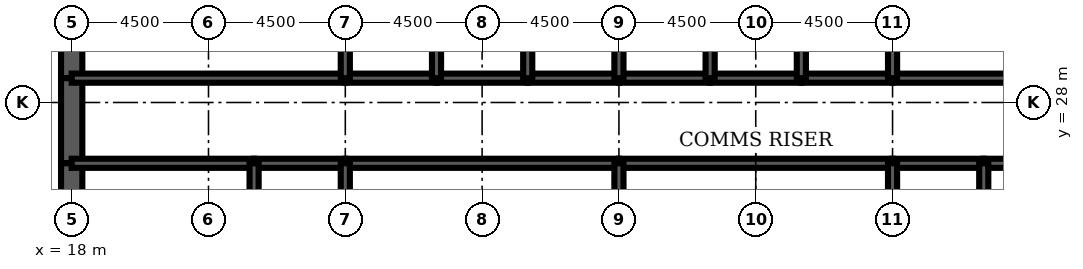
"""IFC4 building model, lengths in metres.
Left out: names, types, materials, properties, quantities, classifications, styles, units other than length and angle.
Written with IfcOpenShell. Run it as: python <this file> out.ifc"""

import sys

from ifc_helpers import new_model, si_unit, direction, frame, frame_2d, origin, place, context, subcontext, project, spatial, rectangle, extrude, element, fill, save


model = new_model("IFC4")
c1 = context("Model", 3, precision=1e-05, world=origin(), true_north=direction((0.0, 1.0)))
c2 = subcontext(c1, "Body", "Model", "MODEL_VIEW")
j1 = project(units=[si_unit("LENGTHUNIT", "METRE"), si_unit("PLANEANGLEUNIT", "RADIAN")], contexts=[c1])
p1 = place(None, origin())
s1 = spatial("IfcSite", under=j1, at=p1, CompositionType="ELEMENT")
p2 = place(p1, origin())
s2 = spatial("IfcBuilding", under=s1, at=p2, CompositionType="ELEMENT")
p3 = place(p2, frame((0.0, 0.0, 304.7)))
s3 = spatial("IfcBuildingStorey", under=s2, at=p3, CompositionType="ELEMENT", Elevation=304.7)
p4 = place(p3, frame((18.0, 32.0, 0.0), z_axis=(0.0, 0.0, 1.0), x_axis=(0.0, -1.0, 0.0)))
e1 = element("IfcWall", 1, at=p4, inside=s3, PredefinedType="SHEAR", context=c2, shape_type="SweptSolid", body=[
    extrude(rectangle(XDim=3.2, YDim=0.7, at=frame_2d((1.6, 0.0))), origin(), (0.0, 0.0, 1.0), 4.2),
])
p5 = place(p3, frame((18.0, 28.8, 0.0), z_axis=(0.0, 0.0, 1.0), x_axis=(0.0, -1.0, 0.0)))
e2 = element("IfcWall", 2, at=p5, inside=s3, PredefinedType="SHEAR", context=c2, shape_type="SweptSolid", body=[
    extrude(rectangle(XDim=2.8, YDim=0.7, at=frame_2d((1.4, 0.0))), origin(), (0.0, 0.0, 1.0), 4.2),
])
p6 = place(p5, frame((0.4, 0.0, 0.0)))
e3 = element("IfcOpeningElement", 3, at=p6, cuts=e2, PredefinedType="OPENING", context=c2, shape_type="SweptSolid", body=[
    extrude(rectangle(XDim=1.8, YDim=2.1, at=frame_2d((0.9, 1.05))), frame((0.0, 0.36, 0.0), z_axis=(0.0, -1.0, 0.0), x_axis=(1.0, 0.0, 0.0)), (0.0, 0.0, 1.0), 0.72),
])
p7 = place(p3, frame((18.0, 26.0, 0.0), z_axis=(0.0, 0.0, 1.0), x_axis=(0.0, -1.0, 0.0)))
e4 = element("IfcWall", 4, at=p7, inside=s3, PredefinedType="SHEAR", context=c2, shape_type="SweptSolid", body=[
    extrude(rectangle(XDim=4.0, YDim=0.7, at=frame_2d((2.0, 0.0))), origin(), (0.0, 0.0, 1.0), 4.2),
])
p8 = place(p3, frame((18.0, 28.8, 0.0), z_axis=(0.0, 0.0, 1.0), x_axis=(1.0, 0.0, 0.0)))
e5 = element("IfcWall", 5, at=p8, inside=s3, PredefinedType="SOLIDWALL", context=c2, shape_type="SweptSolid", body=[
    extrude(rectangle(XDim=9.0, YDim=0.3, at=frame_2d((4.5, 0.0))), origin(), (0.0, 0.0, 1.0), 4.2),
])
p9 = place(p8, frame((0.65, 0.0, 0.0)))
e6 = element("IfcOpeningElement", 6, at=p9, cuts=e5, PredefinedType="OPENING", context=c2, shape_type="SweptSolid", body=[
    extrude(rectangle(XDim=1.0, YDim=2.1, at=frame_2d((0.5, 1.05))), frame((0.0, 0.16, 0.0), z_axis=(0.0, -1.0, 0.0), x_axis=(1.0, 0.0, 0.0)), (0.0, 0.0, 1.0), 0.32),
])
p10 = place(p3, frame((27.0, 28.8, 0.0), z_axis=(0.0, 0.0, 1.0), x_axis=(1.0, 0.0, 0.0)))
e7 = element("IfcWall", 7, at=p10, inside=s3, PredefinedType="SOLIDWALL", context=c2, shape_type="SweptSolid", body=[
    extrude(rectangle(XDim=3.0, YDim=0.3, at=frame_2d((1.5, 0.0))), origin(), (0.0, 0.0, 1.0), 4.2),
])
p11 = place(p10, frame((0.95, 0.0, 0.0)))
e8 = element("IfcOpeningElement", 8, at=p11, cuts=e7, PredefinedType="OPENING", context=c2, shape_type="SweptSolid", body=[
    extrude(rectangle(XDim=1.1, YDim=2.2, at=frame_2d((0.55, 1.1))), frame((0.0, 0.16, 0.0), z_axis=(0.0, -1.0, 0.0), x_axis=(1.0, 0.0, 0.0)), (0.0, 0.0, 1.0), 0.32),
])
p12 = place(p3, frame((30.0, 28.8, 0.0), z_axis=(0.0, 0.0, 1.0), x_axis=(1.0, 0.0, 0.0)))
e9 = element("IfcWall", 9, at=p12, inside=s3, PredefinedType="SOLIDWALL", context=c2, shape_type="SweptSolid", body=[
    extrude(rectangle(XDim=3.0, YDim=0.3, at=frame_2d((1.5, 0.0))), origin(), (0.0, 0.0, 1.0), 4.2),
])
p13 = place(p12, frame((0.95, 0.0, 0.0)))
e10 = element("IfcOpeningElement", 10, at=p13, cuts=e9, PredefinedType="OPENING", context=c2, shape_type="SweptSolid", body=[
    extrude(rectangle(XDim=1.1, YDim=2.2, at=frame_2d((0.55, 1.1))), frame((0.0, 0.16, 0.0), z_axis=(0.0, -1.0, 0.0), x_axis=(1.0, 0.0, 0.0)), (0.0, 0.0, 1.0), 0.32),
])
p14 = place(p3, frame((33.0, 28.8, 0.0), z_axis=(0.0, 0.0, 1.0), x_axis=(1.0, 0.0, 0.0)))
e11 = element("IfcWall", 11, at=p14, inside=s3, PredefinedType="SOLIDWALL", context=c2, shape_type="SweptSolid", body=[
    extrude(rectangle(XDim=3.0, YDim=0.3, at=frame_2d((1.5, 0.0))), origin(), (0.0, 0.0, 1.0), 4.2),
])
p15 = place(p14, frame((0.95, 0.0, 0.0)))
e12 = element("IfcOpeningElement", 12, at=p15, cuts=e11, PredefinedType="OPENING", context=c2, shape_type="SweptSolid", body=[
    extrude(rectangle(XDim=1.1, YDim=2.2, at=frame_2d((0.55, 1.1))), frame((0.0, 0.16, 0.0), z_axis=(0.0, -1.0, 0.0), x_axis=(1.0, 0.0, 0.0)), (0.0, 0.0, 1.0), 0.32),
])
p16 = place(p3, frame((36.0, 28.8, 0.0), z_axis=(0.0, 0.0, 1.0), x_axis=(1.0, 0.0, 0.0)))
e13 = element("IfcWall", 13, at=p16, inside=s3, PredefinedType="SOLIDWALL", context=c2, shape_type="SweptSolid", body=[
    extrude(rectangle(XDim=3.0, YDim=0.3, at=frame_2d((1.5, 0.0))), origin(), (0.0, 0.0, 1.0), 4.2),
])
p17 = place(p16, frame((1.0, 0.0, 0.0)))
e14 = element("IfcOpeningElement", 14, at=p17, cuts=e13, PredefinedType="OPENING", context=c2, shape_type="SweptSolid", body=[
    extrude(rectangle(XDim=1.0, YDim=2.1, at=frame_2d((0.5, 1.05))), frame((0.0, 0.16, 0.0), z_axis=(0.0, -1.0, 0.0), x_axis=(1.0, 0.0, 0.0)), (0.0, 0.0, 1.0), 0.32),
])
p18 = place(p3, frame((39.0, 28.8, 0.0), z_axis=(0.0, 0.0, 1.0), x_axis=(1.0, 0.0, 0.0)))
e15 = element("IfcWall", 15, at=p18, inside=s3, PredefinedType="SOLIDWALL", context=c2, shape_type="SweptSolid", body=[
    extrude(rectangle(XDim=3.0, YDim=0.3, at=frame_2d((1.5, 0.0))), origin(), (0.0, 0.0, 1.0), 4.2),
])
p19 = place(p18, frame((1.0, 0.0, 0.0)))
e16 = element("IfcOpeningElement", 16, at=p19, cuts=e15, PredefinedType="OPENING", context=c2, shape_type="SweptSolid", body=[
    extrude(rectangle(XDim=1.0, YDim=2.1, at=frame_2d((0.5, 1.05))), frame((0.0, 0.16, 0.0), z_axis=(0.0, -1.0, 0.0), x_axis=(1.0, 0.0, 0.0)), (0.0, 0.0, 1.0), 0.32),
])
p20 = place(p3, frame((42.0, 28.8, 0.0), z_axis=(0.0, 0.0, 1.0), x_axis=(1.0, 0.0, 0.0)))
e17 = element("IfcWall", 17, at=p20, inside=s3, PredefinedType="SOLIDWALL", context=c2, shape_type="SweptSolid", body=[
    extrude(rectangle(XDim=3.0, YDim=0.3, at=frame_2d((1.5, 0.0))), origin(), (0.0, 0.0, 1.0), 4.2),
])
p21 = place(p20, frame((0.95, 0.0, 0.0)))
e18 = element("IfcOpeningElement", 18, at=p21, cuts=e17, PredefinedType="OPENING", context=c2, shape_type="SweptSolid", body=[
    extrude(rectangle(XDim=1.1, YDim=2.2, at=frame_2d((0.55, 1.1))), frame((0.0, 0.16, 0.0), z_axis=(0.0, -1.0, 0.0), x_axis=(1.0, 0.0, 0.0)), (0.0, 0.0, 1.0), 0.32),
])
p22 = place(p3, frame((45.0, 28.8, 0.0), z_axis=(0.0, 0.0, 1.0), x_axis=(1.0, 0.0, 0.0)))
e19 = element("IfcWall", 19, at=p22, inside=s3, PredefinedType="SOLIDWALL", context=c2, shape_type="SweptSolid", body=[
    extrude(rectangle(XDim=9.0, YDim=0.3, at=frame_2d((4.5, 0.0))), origin(), (0.0, 0.0, 1.0), 4.2),
])
p23 = place(p22, frame((7.35, 0.0, 0.0)))
e20 = element("IfcOpeningElement", 20, at=p23, cuts=e19, PredefinedType="OPENING", context=c2, shape_type="SweptSolid", body=[
    extrude(rectangle(XDim=1.0, YDim=2.1, at=frame_2d((0.5, 1.05))), frame((0.0, 0.16, 0.0), z_axis=(0.0, -1.0, 0.0), x_axis=(1.0, 0.0, 0.0)), (0.0, 0.0, 1.0), 0.32),
])
p24 = place(p3, frame((18.0, 26.0, 0.0), z_axis=(0.0, 0.0, 1.0), x_axis=(1.0, 0.0, 0.0)))
e21 = element("IfcWall", 21, at=p24, inside=s3, PredefinedType="SOLIDWALL", context=c2, shape_type="SweptSolid", body=[
    extrude(rectangle(XDim=6.0, YDim=0.3, at=frame_2d((3.0, 0.0))), origin(), (0.0, 0.0, 1.0), 4.2),
])
p25 = place(p3, frame((24.0, 26.0, 0.0), z_axis=(0.0, 0.0, 1.0), x_axis=(1.0, 0.0, 0.0)))
e22 = element("IfcWall", 22, at=p25, inside=s3, PredefinedType="SOLIDWALL", context=c2, shape_type="SweptSolid", body=[
    extrude(rectangle(XDim=3.0, YDim=0.3, at=frame_2d((1.5, 0.0))), origin(), (0.0, 0.0, 1.0), 4.2),
])
for number, where, z_axis, x_axis in (
    (23, (27.0, 26.0, 0.0), (0.0, 0.0, 1.0), (1.0, 0.0, 0.0)),
    (24, (36.0, 26.0, 0.0), (0.0, 0.0, 1.0), (1.0, 0.0, 0.0)),
):
    element("IfcWall", number, at=place(p3, frame(where, z_axis=z_axis, x_axis=x_axis)), inside=s3, PredefinedType="SOLIDWALL", context=c2, shape_type="SweptSolid", body=[
        extrude(rectangle(XDim=9.0, YDim=0.3, at=frame_2d((4.5, 0.0))), origin(), (0.0, 0.0, 1.0), 4.2),
    ])
p26 = place(p3, frame((45.0, 26.0, 0.0), z_axis=(0.0, 0.0, 1.0), x_axis=(1.0, 0.0, 0.0)))
e25 = element("IfcWall", 25, at=p26, inside=s3, PredefinedType="SOLIDWALL", context=c2, shape_type="SweptSolid", body=[
    extrude(rectangle(XDim=3.0, YDim=0.3, at=frame_2d((1.5, 0.0))), origin(), (0.0, 0.0, 1.0), 4.2),
])
p27 = place(p3, frame((48.0, 26.0, 0.0), z_axis=(0.0, 0.0, 1.0), x_axis=(1.0, 0.0, 0.0)))
e26 = element("IfcWall", 26, at=p27, inside=s3, PredefinedType="SOLIDWALL", context=c2, shape_type="SweptSolid", body=[
    extrude(rectangle(XDim=6.0, YDim=0.3, at=frame_2d((3.0, 0.0))), origin(), (0.0, 0.0, 1.0), 4.2),
])
for number, where, z_axis, x_axis in (
    (27, (27.0, 28.8, 0.0), (0.0, 0.0, 1.0), (0.0, 1.0, 0.0)),
    (28, (30.0, 28.8, 0.0), (0.0, 0.0, 1.0), (0.0, 1.0, 0.0)),
    (29, (33.0, 28.8, 0.0), (0.0, 0.0, 1.0), (0.0, 1.0, 0.0)),
    (30, (36.0, 28.8, 0.0), (0.0, 0.0, 1.0), (0.0, 1.0, 0.0)),
    (31, (39.0, 28.8, 0.0), (0.0, 0.0, 1.0), (0.0, 1.0, 0.0)),
    (32, (42.0, 28.8, 0.0), (0.0, 0.0, 1.0), (0.0, 1.0, 0.0)),
    (33, (45.0, 28.8, 0.0), (0.0, 0.0, 1.0), (0.0, 1.0, 0.0)),
):
    element("IfcWall", number, at=place(p3, frame(where, z_axis=z_axis, x_axis=x_axis)), inside=s3, PredefinedType="SOLIDWALL", context=c2, shape_type="SweptSolid", body=[
        extrude(rectangle(XDim=3.2, YDim=0.3, at=frame_2d((1.6, 0.0))), origin(), (0.0, 0.0, 1.0), 4.2),
    ])
for number, where, z_axis, x_axis in (
    (34, (24.0, 22.0, 0.0), (0.0, 0.0, 1.0), (0.0, 1.0, 0.0)),
    (35, (27.0, 22.0, 0.0), (0.0, 0.0, 1.0), (0.0, 1.0, 0.0)),
    (36, (36.0, 22.0, 0.0), (0.0, 0.0, 1.0), (0.0, 1.0, 0.0)),
    (37, (45.0, 22.0, 0.0), (0.0, 0.0, 1.0), (0.0, 1.0, 0.0)),
    (38, (48.0, 22.0, 0.0), (0.0, 0.0, 1.0), (0.0, 1.0, 0.0)),
):
    element("IfcWall", number, at=place(p3, frame(where, z_axis=z_axis, x_axis=x_axis)), inside=s3, PredefinedType="SOLIDWALL", context=c2, shape_type="SweptSolid", body=[
        extrude(rectangle(XDim=4.0, YDim=0.3, at=frame_2d((2.0, 0.0))), origin(), (0.0, 0.0, 1.0), 4.2),
    ])
p28 = place(p3, frame((42.5, 22.15, 0.0), z_axis=(0.0, 0.0, 1.0), x_axis=(0.0, 1.0, 0.0)))
e39 = element("IfcWall", 39, at=p28, inside=s3, PredefinedType="PARTITIONING", context=c2, shape_type="SweptSolid", body=[
    extrude(rectangle(XDim=3.7, YDim=0.15, at=frame_2d((1.85, 0.0))), origin(), (0.0, 0.0, 1.0), 3.0),
])
p29 = place(p28, frame((2.2, 0.0, 0.0)))
e40 = element("IfcOpeningElement", 40, at=p29, cuts=e39, PredefinedType="OPENING", context=c2, shape_type="SweptSolid", body=[
    extrude(rectangle(XDim=1.0, YDim=2.1, at=frame_2d((0.5, 1.05))), frame((0.0, 0.085, 0.0), z_axis=(0.0, -1.0, 0.0), x_axis=(1.0, 0.0, 0.0)), (0.0, 0.0, 1.0), 0.17),
])
p30 = place(p3, frame((20.525, 22.15, 0.0), z_axis=(0.0, 0.0, 1.0), x_axis=(0.0, 1.0, 0.0)))
e41 = element("IfcWall", 41, at=p30, inside=s3, PredefinedType="PARTITIONING", context=c2, shape_type="SweptSolid", body=[
    extrude(rectangle(XDim=3.7, YDim=0.15, at=frame_2d((1.85, 0.0))), origin(), (0.0, 0.0, 1.0), 3.0),
])
p31 = place(p3, frame((47.7, 26.15, 0.0), z_axis=(0.0, 0.0, 1.0), x_axis=(0.0, 1.0, 0.0)))
e42 = element("IfcWall", 42, at=p31, inside=s3, PredefinedType="PARTITIONING", context=c2, shape_type="SweptSolid", body=[
    extrude(rectangle(XDim=2.5, YDim=0.15, at=frame_2d((1.25, 0.0))), origin(), (0.0, 0.0, 1.0), 3.0),
])
p32 = place(p31, frame((1.15, 0.0, 0.0)))
e43 = element("IfcOpeningElement", 43, at=p32, cuts=e42, PredefinedType="OPENING", context=c2, shape_type="SweptSolid", body=[
    extrude(rectangle(XDim=1.0, YDim=2.1, at=frame_2d((0.5, 1.05))), frame((0.0, 0.085, 0.0), z_axis=(0.0, -1.0, 0.0), x_axis=(1.0, 0.0, 0.0)), (0.0, 0.0, 1.0), 0.17),
])
p33 = place(p29, origin())
e44 = element("IfcDoor", 44, at=p33, inside=s3, OperationType="SINGLE_SWING_RIGHT", PredefinedType="DOOR", context=c2, shape_type="SweptSolid", body=[
    extrude(rectangle(XDim=1.0, YDim=2.1, at=frame_2d((0.5, 1.05))), frame((0.0, 0.025, 0.0), z_axis=(0.0, -1.0, 0.0), x_axis=(1.0, 0.0, 0.0)), (0.0, 0.0, 1.0), 0.05),
])
fill(e40, e44)
p34 = place(p32, origin())
e45 = element("IfcDoor", 45, at=p34, inside=s3, OperationType="SINGLE_SWING_RIGHT", PredefinedType="DOOR", context=c2, shape_type="SweptSolid", body=[
    extrude(rectangle(XDim=1.0, YDim=2.1, at=frame_2d((0.5, 1.05))), frame((0.0, 0.025, 0.0), z_axis=(0.0, -1.0, 0.0), x_axis=(1.0, 0.0, 0.0)), (0.0, 0.0, 1.0), 0.05),
])
fill(e43, e45)
p35 = place(p21, origin())
e46 = element("IfcDoor", 46, at=p35, inside=s3, OperationType="DOUBLE_DOOR_SLIDING", PredefinedType="USERDEFINED", context=c2, shape_type="SweptSolid", body=[
    extrude(rectangle(XDim=1.1, YDim=2.2, at=frame_2d((0.55, 1.1))), frame((0.0, 0.025, 0.0), z_axis=(0.0, -1.0, 0.0), x_axis=(1.0, 0.0, 0.0)), (0.0, 0.0, 1.0), 0.05),
])
fill(e18, e46)
p36 = place(p11, origin())
e47 = element("IfcDoor", 47, at=p36, inside=s3, OperationType="DOUBLE_DOOR_SLIDING", PredefinedType="USERDEFINED", context=c2, shape_type="SweptSolid", body=[
    extrude(rectangle(XDim=1.1, YDim=2.2, at=frame_2d((0.55, 1.1))), frame((0.0, 0.025, 0.0), z_axis=(0.0, -1.0, 0.0), x_axis=(1.0, 0.0, 0.0)), (0.0, 0.0, 1.0), 0.05),
])
fill(e8, e47)
p37 = place(p13, origin())
e48 = element("IfcDoor", 48, at=p37, inside=s3, OperationType="DOUBLE_DOOR_SLIDING", PredefinedType="USERDEFINED", context=c2, shape_type="SweptSolid", body=[
    extrude(rectangle(XDim=1.1, YDim=2.2, at=frame_2d((0.55, 1.1))), frame((0.0, 0.025, 0.0), z_axis=(0.0, -1.0, 0.0), x_axis=(1.0, 0.0, 0.0)), (0.0, 0.0, 1.0), 0.05),
])
fill(e10, e48)
p38 = place(p15, origin())
e49 = element("IfcDoor", 49, at=p38, inside=s3, OperationType="DOUBLE_DOOR_SLIDING", PredefinedType="USERDEFINED", context=c2, shape_type="SweptSolid", body=[
    extrude(rectangle(XDim=1.1, YDim=2.2, at=frame_2d((0.55, 1.1))), frame((0.0, 0.025, 0.0), z_axis=(0.0, -1.0, 0.0), x_axis=(1.0, 0.0, 0.0)), (0.0, 0.0, 1.0), 0.05),
])
fill(e12, e49)
p39 = place(p9, origin())
e50 = element("IfcDoor", 50, at=p39, inside=s3, OperationType="SINGLE_SWING_LEFT", PredefinedType="DOOR", context=c2, shape_type="SweptSolid", body=[
    extrude(rectangle(XDim=1.0, YDim=2.1, at=frame_2d((0.5, 1.05))), frame((0.0, 0.025, 0.0), z_axis=(0.0, -1.0, 0.0), x_axis=(1.0, 0.0, 0.0)), (0.0, 0.0, 1.0), 0.05),
])
fill(e6, e50)
p40 = place(p6, origin())
e51 = element("IfcDoor", 51, at=p40, inside=s3, OperationType="SINGLE_SWING_LEFT", PredefinedType="DOOR", context=c2, shape_type="SweptSolid", body=[
    extrude(rectangle(XDim=1.8, YDim=2.1, at=frame_2d((0.9, 1.05))), frame((0.0, 0.35, 0.0), z_axis=(0.0, -1.0, 0.0), x_axis=(1.0, 0.0, 0.0)), (0.0, 0.0, 1.0), 0.699),
])
fill(e3, e51)
p41 = place(p17, origin())
e52 = element("IfcDoor", 52, at=p41, inside=s3, OperationType="SINGLE_SWING_LEFT", PredefinedType="DOOR", context=c2, shape_type="SweptSolid", body=[
    extrude(rectangle(XDim=1.0, YDim=2.1, at=frame_2d((0.5, 1.05))), frame((0.0, 0.025, 0.0), z_axis=(0.0, -1.0, 0.0), x_axis=(1.0, 0.0, 0.0)), (0.0, 0.0, 1.0), 0.05),
])
fill(e14, e52)
p42 = place(p19, origin())
e53 = element("IfcDoor", 53, at=p42, inside=s3, OperationType="SINGLE_SWING_LEFT", PredefinedType="DOOR", context=c2, shape_type="SweptSolid", body=[
    extrude(rectangle(XDim=1.0, YDim=2.1, at=frame_2d((0.5, 1.05))), frame((0.0, 0.025, 0.0), z_axis=(0.0, -1.0, 0.0), x_axis=(1.0, 0.0, 0.0)), (0.0, 0.0, 1.0), 0.05),
])
fill(e16, e53)
save(model, sys.argv[1])
